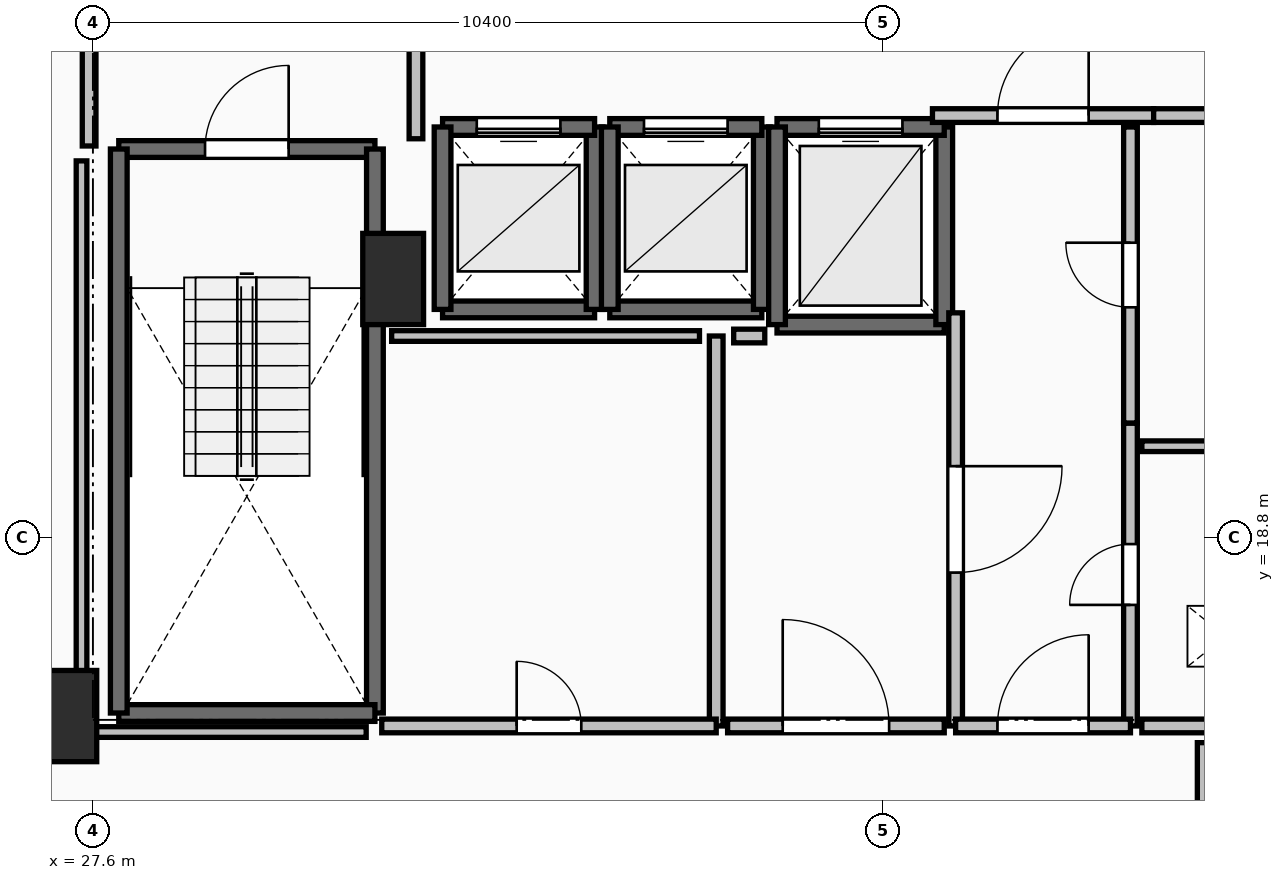
"""IFC4 building model, lengths in metres.
Left out: names, types, materials, properties, quantities, classifications, styles, units other than length and angle.
Written with IfcOpenShell. Run it as: python <this file> out.ifc"""

import sys

from ifc_helpers import new_model, si_unit, direction, frame, frame_2d, origin, origin_2d, place, context, subcontext, project, spatial, rectangle, extrude, element, fill, save


model = new_model("IFC4")
c1 = context("Model", 3, precision=1e-05, world=origin(), true_north=direction((0.0, 1.0)))
c2 = subcontext(c1, "Body", "Model", "MODEL_VIEW")
j1 = project(units=[si_unit("LENGTHUNIT", "METRE"), si_unit("PLANEANGLEUNIT", "RADIAN")], contexts=[c1])
p1 = place(None, origin())
s1 = spatial("IfcSite", under=j1, at=p1, CompositionType="ELEMENT")
p2 = place(p1, origin())
s2 = spatial("IfcBuilding", under=s1, at=p2, CompositionType="ELEMENT")
p3 = place(p2, frame((0.0, 0.0, 136.1)))
s3 = spatial("IfcBuildingStorey", under=s2, at=p3, CompositionType="ELEMENT", Elevation=136.1)
for number, where, z_axis, x_axis in (
    (1, (27.25, 16.45, 0.0), (0.0, 0.0, 1.0), (1.0, 0.0, 0.0)),
    (2, (31.55, 22.2, 0.0), (0.0, 0.0, 1.0), (1.0, 0.0, 0.0)),
):
    element("IfcColumn", number, at=place(p3, frame(where, z_axis=z_axis, x_axis=x_axis)), inside=s3, PredefinedType="PILASTER", context=c2, shape_type="SweptSolid", body=[
        extrude(rectangle(XDim=0.8, YDim=1.2, at=origin_2d()), origin(), (0.0, 0.0, 1.0), 3.5),
    ])
p4 = place(p3, frame((27.94, 23.91, 0.0), z_axis=(0.0, 0.0, 1.0), x_axis=(1.0, 0.0, 0.0)))
e3 = element("IfcWall", 3, at=p4, inside=s3, PredefinedType="SOLIDWALL", context=c2, shape_type="SweptSolid", body=[
    extrude(rectangle(XDim=3.37, YDim=0.22, at=frame_2d((1.685, 0.0))), origin(), (0.0, 0.0, 1.0), 3.24),
])
p5 = place(p4, frame((1.135, 0.0, 0.0)))
e4 = element("IfcOpeningElement", 4, at=p5, cuts=e3, PredefinedType="OPENING", context=c2, shape_type="SweptSolid", body=[
    extrude(rectangle(XDim=1.1, YDim=2.15, at=frame_2d((0.55, 1.075))), frame((0.0, 0.125, 0.0), z_axis=(0.0, -1.0, 0.0), x_axis=(1.0, 0.0, 0.0)), (0.0, 0.0, 1.0), 0.25),
])
p6 = place(p3, frame((31.31, 23.91, 0.0), z_axis=(0.0, 0.0, 1.0), x_axis=(0.0, -1.0, 0.0)))
e5 = element("IfcWall", 5, at=p6, inside=s3, PredefinedType="SOLIDWALL", context=c2, shape_type="SweptSolid", body=[
    extrude(rectangle(XDim=7.42, YDim=0.22, at=frame_2d((3.71, 0.0))), origin(), (0.0, 0.0, 1.0), 3.24),
])
p7 = place(p3, frame((31.31, 16.49, 0.0), z_axis=(0.0, 0.0, 1.0), x_axis=(-1.0, 0.0, 0.0)))
e6 = element("IfcWall", 6, at=p7, inside=s3, PredefinedType="SOLIDWALL", context=c2, shape_type="SweptSolid", body=[
    extrude(rectangle(XDim=3.37, YDim=0.22, at=frame_2d((1.685, 0.0))), origin(), (0.0, 0.0, 1.0), 3.24),
])
p8 = place(p3, frame((27.94, 16.49, 0.0), z_axis=(0.0, 0.0, 1.0), x_axis=(0.0, 1.0, 0.0)))
e7 = element("IfcWall", 7, at=p8, inside=s3, PredefinedType="SOLIDWALL", context=c2, shape_type="SweptSolid", body=[
    extrude(rectangle(XDim=7.42, YDim=0.22, at=frame_2d((3.71, 0.0))), origin(), (0.0, 0.0, 1.0), 3.24),
])
p9 = place(p3, frame((32.2, 21.8, 0.0), z_axis=(0.0, 0.0, 1.0), x_axis=(1.0, 0.0, 0.0)))
e8 = element("IfcWall", 8, at=p9, inside=s3, PredefinedType="SOLIDWALL", context=c2, shape_type="SweptSolid", body=[
    extrude(rectangle(XDim=2.0, YDim=0.22, at=frame_2d((1.0, 0.0))), origin(), (0.0, 0.0, 1.0), 3.24),
])
p10 = place(p3, frame((34.2, 21.8, 0.0), z_axis=(0.0, 0.0, 1.0), x_axis=(0.0, 1.0, 0.0)))
e9 = element("IfcWall", 9, at=p10, inside=s3, PredefinedType="SOLIDWALL", context=c2, shape_type="SweptSolid", body=[
    extrude(rectangle(XDim=2.4, YDim=0.22, at=frame_2d((1.2, 0.0))), origin(), (0.0, 0.0, 1.0), 3.24),
])
p11 = place(p3, frame((34.2, 24.2, 0.0), z_axis=(0.0, 0.0, 1.0), x_axis=(-1.0, 0.0, 0.0)))
e10 = element("IfcWall", 10, at=p11, inside=s3, PredefinedType="SOLIDWALL", context=c2, shape_type="SweptSolid", body=[
    extrude(rectangle(XDim=2.0, YDim=0.22, at=frame_2d((1.0, 0.0))), origin(), (0.0, 0.0, 1.0), 3.24),
])
p12 = place(p11, frame((0.45, 0.0, 0.0)))
e11 = element("IfcOpeningElement", 11, at=p12, cuts=e10, PredefinedType="OPENING", context=c2, shape_type="SweptSolid", body=[
    extrude(rectangle(XDim=1.1, YDim=2.2, at=frame_2d((0.55, 1.1))), frame((0.0, 0.125, 0.0), z_axis=(0.0, -1.0, 0.0), x_axis=(1.0, 0.0, 0.0)), (0.0, 0.0, 1.0), 0.25),
])
p13 = place(p3, frame((32.2, 24.2, 0.0), z_axis=(0.0, 0.0, 1.0), x_axis=(0.0, -1.0, 0.0)))
e12 = element("IfcWall", 12, at=p13, inside=s3, PredefinedType="SOLIDWALL", context=c2, shape_type="SweptSolid", body=[
    extrude(rectangle(XDim=2.4, YDim=0.22, at=frame_2d((1.2, 0.0))), origin(), (0.0, 0.0, 1.0), 3.24),
])
p14 = place(p3, frame((34.4, 21.8, 0.0), z_axis=(0.0, 0.0, 1.0), x_axis=(1.0, 0.0, 0.0)))
e13 = element("IfcWall", 13, at=p14, inside=s3, PredefinedType="SOLIDWALL", context=c2, shape_type="SweptSolid", body=[
    extrude(rectangle(XDim=2.0, YDim=0.22, at=frame_2d((1.0, 0.0))), origin(), (0.0, 0.0, 1.0), 3.24),
])
p15 = place(p3, frame((36.4, 21.8, 0.0), z_axis=(0.0, 0.0, 1.0), x_axis=(0.0, 1.0, 0.0)))
e14 = element("IfcWall", 14, at=p15, inside=s3, PredefinedType="SOLIDWALL", context=c2, shape_type="SweptSolid", body=[
    extrude(rectangle(XDim=2.4, YDim=0.22, at=frame_2d((1.2, 0.0))), origin(), (0.0, 0.0, 1.0), 3.24),
])
p16 = place(p3, frame((36.4, 24.2, 0.0), z_axis=(0.0, 0.0, 1.0), x_axis=(-1.0, 0.0, 0.0)))
e15 = element("IfcWall", 15, at=p16, inside=s3, PredefinedType="SOLIDWALL", context=c2, shape_type="SweptSolid", body=[
    extrude(rectangle(XDim=2.0, YDim=0.22, at=frame_2d((1.0, 0.0))), origin(), (0.0, 0.0, 1.0), 3.24),
])
p17 = place(p16, frame((0.45, 0.0, 0.0)))
e16 = element("IfcOpeningElement", 16, at=p17, cuts=e15, PredefinedType="OPENING", context=c2, shape_type="SweptSolid", body=[
    extrude(rectangle(XDim=1.1, YDim=2.2, at=frame_2d((0.55, 1.1))), frame((0.0, 0.125, 0.0), z_axis=(0.0, -1.0, 0.0), x_axis=(1.0, 0.0, 0.0)), (0.0, 0.0, 1.0), 0.25),
])
p18 = place(p3, frame((34.4, 24.2, 0.0), z_axis=(0.0, 0.0, 1.0), x_axis=(0.0, -1.0, 0.0)))
e17 = element("IfcWall", 17, at=p18, inside=s3, PredefinedType="SOLIDWALL", context=c2, shape_type="SweptSolid", body=[
    extrude(rectangle(XDim=2.4, YDim=0.22, at=frame_2d((1.2, 0.0))), origin(), (0.0, 0.0, 1.0), 3.24),
])
p19 = place(p3, frame((36.6, 21.6, 0.0), z_axis=(0.0, 0.0, 1.0), x_axis=(1.0, 0.0, 0.0)))
e18 = element("IfcWall", 18, at=p19, inside=s3, PredefinedType="SOLIDWALL", context=c2, shape_type="SweptSolid", body=[
    extrude(rectangle(XDim=2.2, YDim=0.22, at=frame_2d((1.1, 0.0))), origin(), (0.0, 0.0, 1.0), 3.24),
])
p20 = place(p3, frame((38.8, 21.6, 0.0), z_axis=(0.0, 0.0, 1.0), x_axis=(0.0, 1.0, 0.0)))
e19 = element("IfcWall", 19, at=p20, inside=s3, PredefinedType="SOLIDWALL", context=c2, shape_type="SweptSolid", body=[
    extrude(rectangle(XDim=2.6, YDim=0.22, at=frame_2d((1.3, 0.0))), origin(), (0.0, 0.0, 1.0), 3.24),
])
p21 = place(p3, frame((38.8, 24.2, 0.0), z_axis=(0.0, 0.0, 1.0), x_axis=(-1.0, 0.0, 0.0)))
e20 = element("IfcWall", 20, at=p21, inside=s3, PredefinedType="SOLIDWALL", context=c2, shape_type="SweptSolid", body=[
    extrude(rectangle(XDim=2.2, YDim=0.22, at=frame_2d((1.1, 0.0))), origin(), (0.0, 0.0, 1.0), 3.24),
])
p22 = place(p21, frame((0.55, 0.0, 0.0)))
e21 = element("IfcOpeningElement", 21, at=p22, cuts=e20, PredefinedType="OPENING", context=c2, shape_type="SweptSolid", body=[
    extrude(rectangle(XDim=1.1, YDim=2.2, at=frame_2d((0.55, 1.1))), frame((0.0, 0.125, 0.0), z_axis=(0.0, -1.0, 0.0), x_axis=(1.0, 0.0, 0.0)), (0.0, 0.0, 1.0), 0.25),
])
p23 = place(p3, frame((36.6, 24.2, 0.0), z_axis=(0.0, 0.0, 1.0), x_axis=(0.0, -1.0, 0.0)))
e22 = element("IfcWall", 22, at=p23, inside=s3, PredefinedType="SOLIDWALL", context=c2, shape_type="SweptSolid", body=[
    extrude(rectangle(XDim=2.6, YDim=0.22, at=frame_2d((1.3, 0.0))), origin(), (0.0, 0.0, 1.0), 3.24),
])
p24 = place(p3, frame((31.85, 24.045, 0.0), z_axis=(0.0, 0.0, 1.0), x_axis=(0.0, 1.0, 0.0)))
e23 = element("IfcWall", 23, at=p24, inside=s3, PredefinedType="PARTITIONING", context=c2, shape_type="SweptSolid", body=[
    extrude(rectangle(XDim=3.91, YDim=0.18, at=frame_2d((1.955, 0.0))), origin(), (0.0, 0.0, 1.0), 3.24),
])
p25 = place(p24, frame((1.355, 0.0, 0.0)))
e24 = element("IfcOpeningElement", 24, at=p25, cuts=e23, PredefinedType="OPENING", context=c2, shape_type="SweptSolid", body=[
    extrude(rectangle(XDim=1.2, YDim=2.15, at=frame_2d((0.6, 1.075))), frame((0.0, 0.105, 0.0), z_axis=(0.0, -1.0, 0.0), x_axis=(1.0, 0.0, 0.0)), (0.0, 0.0, 1.0), 0.21),
])
p26 = place(p3, frame((27.55, 28.0, 0.0), z_axis=(0.0, 0.0, 1.0), x_axis=(0.0, -1.0, 0.0)))
e25 = element("IfcWall", 25, at=p26, inside=s3, PredefinedType="PARTITIONING", context=c2, shape_type="SweptSolid", body=[
    extrude(rectangle(XDim=4.05, YDim=0.18, at=frame_2d((2.025, 0.0))), origin(), (0.0, 0.0, 1.0), 3.24),
])
p27 = place(p26, frame((1.425, 0.0, 0.0)))
e26 = element("IfcOpeningElement", 26, at=p27, cuts=e25, PredefinedType="OPENING", context=c2, shape_type="SweptSolid", body=[
    extrude(rectangle(XDim=1.2, YDim=2.15, at=frame_2d((0.6, 1.075))), frame((0.0, 0.105, 0.0), z_axis=(0.0, -1.0, 0.0), x_axis=(1.0, 0.0, 0.0)), (0.0, 0.0, 1.0), 0.21),
])
p28 = place(p3, frame((38.645, 24.35, 0.0), z_axis=(0.0, 0.0, 1.0), x_axis=(1.0, 0.0, 0.0)))
e27 = element("IfcWall", 27, at=p28, inside=s3, PredefinedType="PARTITIONING", context=c2, shape_type="SweptSolid", body=[
    extrude(rectangle(XDim=2.91, YDim=0.18, at=frame_2d((1.455, 0.0))), origin(), (0.0, 0.0, 1.0), 3.24),
])
p29 = place(p28, frame((0.855, 0.0, 0.0)))
e28 = element("IfcOpeningElement", 28, at=p29, cuts=e27, PredefinedType="OPENING", context=c2, shape_type="SweptSolid", body=[
    extrude(rectangle(XDim=1.2, YDim=2.15, at=frame_2d((0.6, 1.075))), frame((0.0, 0.105, 0.0), z_axis=(0.0, -1.0, 0.0), x_axis=(1.0, 0.0, 0.0)), (0.0, 0.0, 1.0), 0.21),
])
p30 = place(p3, frame((41.555, 24.35, 0.0), z_axis=(0.0, 0.0, 1.0), x_axis=(1.0, 0.0, 0.0)))
e29 = element("IfcWall", 29, at=p30, inside=s3, PredefinedType="PARTITIONING", context=c2, shape_type="SweptSolid", body=[
    extrude(rectangle(XDim=2.445, YDim=0.18, at=frame_2d((1.223, 0.0))), origin(), (0.0, 0.0, 1.0), 3.24),
])
p31 = place(p30, frame((0.798, 0.0, 0.0)))
e30 = element("IfcOpeningElement", 30, at=p31, cuts=e29, PredefinedType="OPENING", context=c2, shape_type="SweptSolid", body=[
    extrude(rectangle(XDim=0.85, YDim=2.1, at=frame_2d((0.425, 1.05))), frame((0.0, 0.105, 0.0), z_axis=(0.0, -1.0, 0.0), x_axis=(1.0, 0.0, 0.0)), (0.0, 0.0, 1.0), 0.21),
])
p32 = place(p3, frame((41.25, 16.32, 0.0), z_axis=(0.0, 0.0, 1.0), x_axis=(0.0, 1.0, 0.0)))
e31 = element("IfcWall", 31, at=p32, inside=s3, PredefinedType="PARTITIONING", context=c2, shape_type="SweptSolid", body=[
    extrude(rectangle(XDim=3.985, YDim=0.18, at=frame_2d((1.992, 0.0))), origin(), (0.0, 0.0, 1.0), 3.24),
])
p33 = place(p32, frame((1.593, 0.0, 0.0)))
e32 = element("IfcOpeningElement", 32, at=p33, cuts=e31, PredefinedType="OPENING", context=c2, shape_type="SweptSolid", body=[
    extrude(rectangle(XDim=0.8, YDim=2.05, at=frame_2d((0.4, 1.025))), frame((0.0, 0.105, 0.0), z_axis=(0.0, -1.0, 0.0), x_axis=(1.0, 0.0, 0.0)), (0.0, 0.0, 1.0), 0.21),
])
p34 = place(p3, frame((41.25, 20.305, 0.0), z_axis=(0.0, 0.0, 1.0), x_axis=(0.0, 1.0, 0.0)))
e33 = element("IfcWall", 33, at=p34, inside=s3, PredefinedType="PARTITIONING", context=c2, shape_type="SweptSolid", body=[
    extrude(rectangle(XDim=3.895, YDim=0.18, at=frame_2d((1.948, 0.0))), origin(), (0.0, 0.0, 1.0), 3.24),
])
p35 = place(p34, frame((1.522, 0.0, 0.0)))
e34 = element("IfcOpeningElement", 34, at=p35, cuts=e33, PredefinedType="OPENING", context=c2, shape_type="SweptSolid", body=[
    extrude(rectangle(XDim=0.85, YDim=2.1, at=frame_2d((0.425, 1.05))), frame((0.0, 0.105, 0.0), z_axis=(0.0, -1.0, 0.0), x_axis=(1.0, 0.0, 0.0)), (0.0, 0.0, 1.0), 0.21),
])
p36 = place(p3, frame((38.95, 21.755, 0.0), z_axis=(0.0, 0.0, 1.0), x_axis=(0.0, -1.0, 0.0)))
e35 = element("IfcWall", 35, at=p36, inside=s3, PredefinedType="PARTITIONING", context=c2, shape_type="SweptSolid", body=[
    extrude(rectangle(XDim=5.435, YDim=0.18, at=frame_2d((2.717, 0.0))), origin(), (0.0, 0.0, 1.0), 3.24),
])
p37 = place(p36, frame((2.018, 0.0, 0.0)))
e36 = element("IfcOpeningElement", 36, at=p37, cuts=e35, PredefinedType="OPENING", context=c2, shape_type="SweptSolid", body=[
    extrude(rectangle(XDim=1.4, YDim=2.2, at=frame_2d((0.7, 1.1))), frame((0.0, 0.105, 0.0), z_axis=(0.0, -1.0, 0.0), x_axis=(1.0, 0.0, 0.0)), (0.0, 0.0, 1.0), 0.21),
])
p38 = place(p3, frame((38.95, 16.32, 0.0), z_axis=(0.0, 0.0, 1.0), x_axis=(1.0, 0.0, 0.0)))
e37 = element("IfcWall", 37, at=p38, inside=s3, PredefinedType="PARTITIONING", context=c2, shape_type="SweptSolid", body=[
    extrude(rectangle(XDim=2.3, YDim=0.18, at=frame_2d((1.15, 0.0))), origin(), (0.0, 0.0, 1.0), 3.24),
])
p39 = place(p38, frame((0.55, 0.0, 0.0)))
e38 = element("IfcOpeningElement", 38, at=p39, cuts=e37, PredefinedType="OPENING", context=c2, shape_type="SweptSolid", body=[
    extrude(rectangle(XDim=1.2, YDim=2.15, at=frame_2d((0.6, 1.075))), frame((0.0, 0.105, 0.0), z_axis=(0.0, -1.0, 0.0), x_axis=(1.0, 0.0, 0.0)), (0.0, 0.0, 1.0), 0.21),
])
p40 = place(p3, frame((44.6, 20.0, 0.0), z_axis=(0.0, 0.0, 1.0), x_axis=(-1.0, 0.0, 0.0)))
e39 = element("IfcWall", 39, at=p40, inside=s3, PredefinedType="PARTITIONING", context=c2, shape_type="SweptSolid", body=[
    extrude(rectangle(XDim=3.2, YDim=0.14, at=frame_2d((1.6, 0.0))), origin(), (0.0, 0.0, 1.0), 3.24),
])
p41 = place(p3, frame((41.4, 16.32, 0.0), z_axis=(0.0, 0.0, 1.0), x_axis=(1.0, 0.0, 0.0)))
e40 = element("IfcWall", 40, at=p41, inside=s3, PredefinedType="PARTITIONING", context=c2, shape_type="SweptSolid", body=[
    extrude(rectangle(XDim=3.2, YDim=0.18, at=frame_2d((1.6, 0.0))), origin(), (0.0, 0.0, 1.0), 3.24),
])
p42 = place(p41, frame((1.2, 0.0, 0.0)))
e41 = element("IfcOpeningElement", 41, at=p42, cuts=e40, PredefinedType="OPENING", context=c2, shape_type="SweptSolid", body=[
    extrude(rectangle(XDim=0.8, YDim=2.05, at=frame_2d((0.4, 1.025))), frame((0.0, 0.105, 0.0), z_axis=(0.0, -1.0, 0.0), x_axis=(1.0, 0.0, 0.0)), (0.0, 0.0, 1.0), 0.21),
])
p43 = place(p3, frame((35.8, 16.32, 0.0), z_axis=(0.0, 0.0, 1.0), x_axis=(0.0, 1.0, 0.0)))
e42 = element("IfcWall", 42, at=p43, inside=s3, PredefinedType="PARTITIONING", context=c2, shape_type="SweptSolid", body=[
    extrude(rectangle(XDim=5.13, YDim=0.18, at=frame_2d((2.565, 0.0))), origin(), (0.0, 0.0, 1.0), 3.24),
])
p44 = place(p3, frame((31.4, 16.32, 0.0), z_axis=(0.0, 0.0, 1.0), x_axis=(1.0, 0.0, 0.0)))
e43 = element("IfcWall", 43, at=p44, inside=s3, PredefinedType="PARTITIONING", context=c2, shape_type="SweptSolid", body=[
    extrude(rectangle(XDim=4.4, YDim=0.18, at=frame_2d((2.2, 0.0))), origin(), (0.0, 0.0, 1.0), 3.24),
])
p45 = place(p44, frame((1.775, 0.0, 0.0)))
e44 = element("IfcOpeningElement", 44, at=p45, cuts=e43, PredefinedType="OPENING", context=c2, shape_type="SweptSolid", body=[
    extrude(rectangle(XDim=0.85, YDim=2.1, at=frame_2d((0.425, 1.05))), frame((0.0, 0.105, 0.0), z_axis=(0.0, -1.0, 0.0), x_axis=(1.0, 0.0, 0.0)), (0.0, 0.0, 1.0), 0.21),
])
p46 = place(p3, frame((35.95, 16.32, 0.0), z_axis=(0.0, 0.0, 1.0), x_axis=(1.0, 0.0, 0.0)))
e45 = element("IfcWall", 45, at=p46, inside=s3, PredefinedType="PARTITIONING", context=c2, shape_type="SweptSolid", body=[
    extrude(rectangle(XDim=2.85, YDim=0.18, at=frame_2d((1.425, 0.0))), origin(), (0.0, 0.0, 1.0), 3.24),
])
p47 = place(p46, frame((0.725, 0.0, 0.0)))
e46 = element("IfcOpeningElement", 46, at=p47, cuts=e45, PredefinedType="OPENING", context=c2, shape_type="SweptSolid", body=[
    extrude(rectangle(XDim=1.4, YDim=2.2, at=frame_2d((0.7, 1.1))), frame((0.0, 0.105, 0.0), z_axis=(0.0, -1.0, 0.0), x_axis=(1.0, 0.0, 0.0)), (0.0, 0.0, 1.0), 0.21),
])
p48 = place(p3, frame((35.58, 21.45, 0.0), z_axis=(0.0, 0.0, 1.0), x_axis=(-1.0, 0.0, 0.0)))
e47 = element("IfcWall", 47, at=p48, inside=s3, PredefinedType="PARTITIONING", context=c2, shape_type="SweptSolid", body=[
    extrude(rectangle(XDim=4.05, YDim=0.14, at=frame_2d((2.025, 0.0))), origin(), (0.0, 0.0, 1.0), 3.24),
])
p49 = place(p3, frame((36.439, 21.45, 0.0), z_axis=(0.0, 0.0, 1.0), x_axis=(-1.0, 0.0, 0.0)))
e48 = element("IfcWall", 48, at=p49, inside=s3, PredefinedType="PARTITIONING", context=c2, shape_type="SweptSolid", body=[
    extrude(rectangle(XDim=0.409, YDim=0.18, at=frame_2d((0.205, 0.0))), origin(), (0.0, 0.0, 1.0), 3.24),
])
p50 = place(p3, frame((27.45, 23.754, 0.0), z_axis=(0.0, 0.0, 1.0), x_axis=(0.0, -1.0, 0.0)))
e49 = element("IfcWall", 49, at=p50, inside=s3, PredefinedType="PARTITIONING", context=c2, shape_type="SweptSolid", body=[
    extrude(rectangle(XDim=7.514, YDim=0.14, at=frame_2d((3.757, 0.0))), origin(), (0.0, 0.0, 1.0), 2.432),
])
p51 = place(p3, frame((27.45, 16.24, 0.0), z_axis=(0.0, 0.0, 1.0), x_axis=(1.0, 0.0, 0.0)))
e50 = element("IfcWall", 50, at=p51, inside=s3, PredefinedType="PARTITIONING", context=c2, shape_type="SweptSolid", body=[
    extrude(rectangle(XDim=3.745, YDim=0.14, at=frame_2d((1.873, 0.0))), origin(), (0.0, 0.0, 1.0), 2.432),
])
p52 = place(p3, frame((42.2, 16.1, 0.0), z_axis=(0.0, 0.0, 1.0), x_axis=(0.0, -1.0, 0.0)))
e51 = element("IfcWall", 51, at=p52, inside=s3, PredefinedType="PARTITIONING", context=c2, shape_type="SweptSolid", body=[
    extrude(rectangle(XDim=1.83, YDim=0.14, at=frame_2d((0.915, 0.0))), origin(), (0.0, 0.0, 1.0), 3.24),
])
p53 = place(p5, origin())
e52 = element("IfcDoor", 52, at=p53, inside=s3, OperationType="SINGLE_SWING_RIGHT", PredefinedType="DOOR", context=c2, shape_type="SweptSolid", body=[
    extrude(rectangle(XDim=1.1, YDim=2.15, at=frame_2d((0.55, 1.075))), frame((0.0, 0.025, 0.0), z_axis=(0.0, -1.0, 0.0), x_axis=(1.0, 0.0, 0.0)), (0.0, 0.0, 1.0), 0.05),
])
fill(e4, e52)
p54 = place(p12, origin())
e53 = element("IfcDoor", 53, at=p54, inside=s3, OperationType="SLIDING_TO_LEFT", PredefinedType="DOOR", context=c2, shape_type="SweptSolid", body=[
    extrude(rectangle(XDim=1.1, YDim=2.2, at=frame_2d((0.55, 1.1))), frame((0.0, 0.025, 0.0), z_axis=(0.0, -1.0, 0.0), x_axis=(1.0, 0.0, 0.0)), (0.0, 0.0, 1.0), 0.05),
])
fill(e11, e53)
p55 = place(p17, origin())
e54 = element("IfcDoor", 54, at=p55, inside=s3, OperationType="SLIDING_TO_LEFT", PredefinedType="DOOR", context=c2, shape_type="SweptSolid", body=[
    extrude(rectangle(XDim=1.1, YDim=2.2, at=frame_2d((0.55, 1.1))), frame((0.0, 0.025, 0.0), z_axis=(0.0, -1.0, 0.0), x_axis=(1.0, 0.0, 0.0)), (0.0, 0.0, 1.0), 0.05),
])
fill(e16, e54)
p56 = place(p22, origin())
e55 = element("IfcDoor", 55, at=p56, inside=s3, OperationType="SLIDING_TO_LEFT", PredefinedType="DOOR", context=c2, shape_type="SweptSolid", body=[
    extrude(rectangle(XDim=1.1, YDim=2.2, at=frame_2d((0.55, 1.1))), frame((0.0, 0.025, 0.0), z_axis=(0.0, -1.0, 0.0), x_axis=(1.0, 0.0, 0.0)), (0.0, 0.0, 1.0), 0.05),
])
fill(e21, e55)
p57 = place(p29, origin())
e56 = element("IfcDoor", 56, at=p57, inside=s3, OperationType="SINGLE_SWING_RIGHT", PredefinedType="DOOR", context=c2, shape_type="SweptSolid", body=[
    extrude(rectangle(XDim=1.2, YDim=2.15, at=frame_2d((0.6, 1.075))), frame((0.0, 0.025, 0.0), z_axis=(0.0, -1.0, 0.0), x_axis=(1.0, 0.0, 0.0)), (0.0, 0.0, 1.0), 0.05),
])
fill(e28, e56)
p58 = place(p33, origin())
e57 = element("IfcDoor", 57, at=p58, inside=s3, OperationType="SINGLE_SWING_LEFT", PredefinedType="DOOR", context=c2, shape_type="SweptSolid", body=[
    extrude(rectangle(XDim=0.8, YDim=2.05, at=frame_2d((0.4, 1.025))), frame((0.0, 0.025, 0.0), z_axis=(0.0, -1.0, 0.0), x_axis=(1.0, 0.0, 0.0)), (0.0, 0.0, 1.0), 0.05),
])
fill(e32, e57)
p59 = place(p35, origin())
e58 = element("IfcDoor", 58, at=p59, inside=s3, OperationType="SINGLE_SWING_RIGHT", PredefinedType="DOOR", context=c2, shape_type="SweptSolid", body=[
    extrude(rectangle(XDim=0.85, YDim=2.1, at=frame_2d((0.425, 1.05))), frame((0.0, 0.025, 0.0), z_axis=(0.0, -1.0, 0.0), x_axis=(1.0, 0.0, 0.0)), (0.0, 0.0, 1.0), 0.05),
])
fill(e34, e58)
p60 = place(p37, origin())
e59 = element("IfcDoor", 59, at=p60, inside=s3, OperationType="DOUBLE_SWING_LEFT", PredefinedType="DOOR", context=c2, shape_type="SweptSolid", body=[
    extrude(rectangle(XDim=1.4, YDim=2.2, at=frame_2d((0.7, 1.1))), frame((0.0, 0.025, 0.0), z_axis=(0.0, -1.0, 0.0), x_axis=(1.0, 0.0, 0.0)), (0.0, 0.0, 1.0), 0.05),
])
fill(e36, e59)
p61 = place(p39, origin())
e60 = element("IfcDoor", 60, at=p61, inside=s3, OperationType="SINGLE_SWING_RIGHT", PredefinedType="DOOR", context=c2, shape_type="SweptSolid", body=[
    extrude(rectangle(XDim=1.2, YDim=2.15, at=frame_2d((0.6, 1.075))), frame((0.0, 0.025, 0.0), z_axis=(0.0, -1.0, 0.0), x_axis=(1.0, 0.0, 0.0)), (0.0, 0.0, 1.0), 0.05),
])
fill(e38, e60)
p62 = place(p45, origin())
e61 = element("IfcDoor", 61, at=p62, inside=s3, OperationType="SINGLE_SWING_LEFT", PredefinedType="DOOR", context=c2, shape_type="SweptSolid", body=[
    extrude(rectangle(XDim=0.85, YDim=2.1, at=frame_2d((0.425, 1.05))), frame((0.0, 0.025, 0.0), z_axis=(0.0, -1.0, 0.0), x_axis=(1.0, 0.0, 0.0)), (0.0, 0.0, 1.0), 0.05),
])
fill(e44, e61)
p63 = place(p47, origin())
e62 = element("IfcDoor", 62, at=p63, inside=s3, OperationType="DOUBLE_SWING_LEFT", PredefinedType="DOOR", context=c2, shape_type="SweptSolid", body=[
    extrude(rectangle(XDim=1.4, YDim=2.2, at=frame_2d((0.7, 1.1))), frame((0.0, 0.025, 0.0), z_axis=(0.0, -1.0, 0.0), x_axis=(1.0, 0.0, 0.0)), (0.0, 0.0, 1.0), 0.05),
])
fill(e46, e62)
save(model, sys.argv[1])
